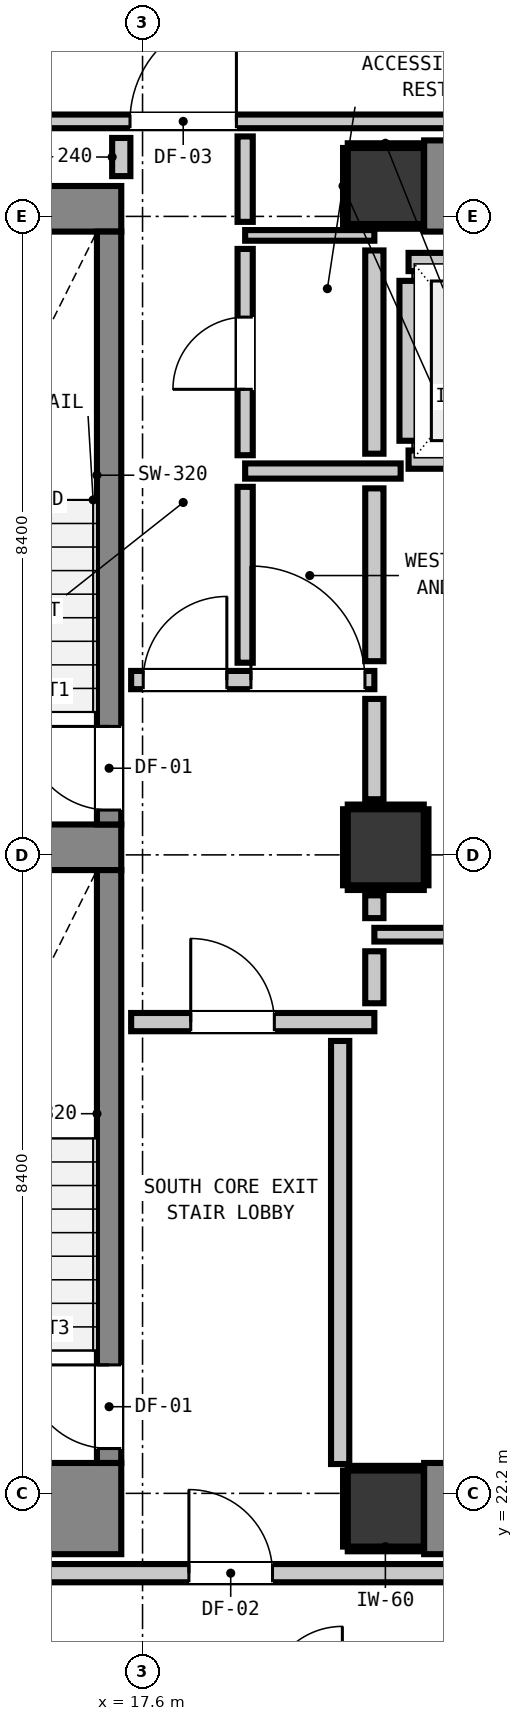
"""IFC4 building model, lengths in metres.
Left out: names, types, materials, properties, quantities, classifications, styles, units other than length and angle.
Written with IfcOpenShell. Run it as: python <this file> out.ifc"""

import sys

from ifc_helpers import new_model, si_unit, direction, frame, frame_2d, origin, origin_2d, place, context, subcontext, project, spatial, rectangle, extrude, element, fill, save


model = new_model("IFC4")
c1 = context("Model", 3, precision=1e-05, world=origin(), true_north=direction((0.0, 1.0)))
c2 = subcontext(c1, "Body", "Model", "MODEL_VIEW")
j1 = project(units=[si_unit("LENGTHUNIT", "METRE"), si_unit("PLANEANGLEUNIT", "RADIAN")], contexts=[c1])
p1 = place(None, origin())
s1 = spatial("IfcSite", under=j1, at=p1, CompositionType="ELEMENT")
p2 = place(p1, origin())
s2 = spatial("IfcBuilding", under=s1, at=p2, CompositionType="ELEMENT")
p3 = place(p2, frame((0.0, 0.0, 22.0)))
s3 = spatial("IfcBuildingStorey", under=s2, at=p3, CompositionType="ELEMENT", Elevation=22.0)
for number, where, z_axis, x_axis in (
    (1, (20.8, 22.0, 0.0), (0.0, 0.0, 1.0), (1.0, 0.0, 0.0)),
    (2, (20.8, 39.4, 0.0), (0.0, 0.0, 1.0), (1.0, 0.0, 0.0)),
):
    element("IfcColumn", number, at=place(p3, frame(where, z_axis=z_axis, x_axis=x_axis)), inside=s3, PredefinedType="COLUMN", context=c2, shape_type="SweptSolid", body=[
        extrude(rectangle(XDim=1.0, YDim=1.0, at=origin_2d()), origin(), (0.0, 0.0, 1.0), 3.32),
    ])
p4 = place(p3, frame((13.24, 22.0, 0.0), z_axis=(0.0, 0.0, 1.0), x_axis=(1.0, 0.0, 0.0)))
e3 = element("IfcWall", 3, at=p4, inside=s3, PredefinedType="SHEAR", context=c2, shape_type="SweptSolid", body=[
    extrude(rectangle(XDim=4.08, YDim=1.2, at=frame_2d((2.04, 0.0))), origin(), (0.0, 0.0, 1.0), 3.32),
])
p5 = place(p3, frame((13.24, 39.1, 0.0), z_axis=(0.0, 0.0, 1.0), x_axis=(1.0, 0.0, 0.0)))
e4 = element("IfcWall", 4, at=p5, inside=s3, PredefinedType="SHEAR", context=c2, shape_type="SweptSolid", body=[
    extrude(rectangle(XDim=4.08, YDim=0.6, at=frame_2d((2.04, 0.0))), origin(), (0.0, 0.0, 1.0), 3.32),
])
p6 = place(p3, frame((13.905, 30.7, 0.0), z_axis=(0.0, 0.0, 1.0), x_axis=(1.0, 0.0, 0.0)))
e5 = element("IfcWall", 5, at=p6, inside=s3, PredefinedType="SHEAR", context=c2, shape_type="SweptSolid", body=[
    extrude(rectangle(XDim=3.415, YDim=0.6, at=frame_2d((1.708, 0.0))), origin(), (0.0, 0.0, 1.0), 3.32),
])
for number, where, z_axis, x_axis in (
    (6, (21.305, 22.0, 0.0), (0.0, 0.0, 1.0), (1.0, 0.0, 0.0)),
    (7, (21.305, 39.4, 0.0), (0.0, 0.0, 1.0), (1.0, 0.0, 0.0)),
):
    element("IfcWall", number, at=place(p3, frame(where, z_axis=z_axis, x_axis=x_axis)), inside=s3, PredefinedType="SHEAR", context=c2, shape_type="SweptSolid", body=[
        extrude(rectangle(XDim=7.39, YDim=1.2, at=frame_2d((3.695, 0.0))), origin(), (0.0, 0.0, 1.0), 3.32),
    ])
p7 = place(p3, frame((17.16, 31.0, 0.0), z_axis=(0.0, 0.0, 1.0), x_axis=(0.0, 1.0, 0.0)))
e8 = element("IfcWall", 8, at=p7, inside=s3, PredefinedType="SHEAR", context=c2, shape_type="SweptSolid", body=[
    extrude(rectangle(XDim=7.8, YDim=0.32, at=frame_2d((3.9, 0.0))), origin(), (0.0, 0.0, 1.0), 3.32),
])
p8 = place(p7, frame((0.19, 0.0, 0.0)))
e9 = element("IfcOpeningElement", 9, at=p8, cuts=e8, PredefinedType="OPENING", context=c2, shape_type="SweptSolid", body=[
    extrude(rectangle(XDim=1.1, YDim=2.15, at=frame_2d((0.55, 1.075))), frame((0.0, 0.17, 0.0), z_axis=(0.0, -1.0, 0.0), x_axis=(1.0, 0.0, 0.0)), (0.0, 0.0, 1.0), 0.34),
])
p9 = place(p3, frame((17.16, 22.6, 0.0), z_axis=(0.0, 0.0, 1.0), x_axis=(0.0, 1.0, 0.0)))
e10 = element("IfcWall", 10, at=p9, inside=s3, PredefinedType="SHEAR", context=c2, shape_type="SweptSolid", body=[
    extrude(rectangle(XDim=7.8, YDim=0.32, at=frame_2d((3.9, 0.0))), origin(), (0.0, 0.0, 1.0), 3.32),
])
p10 = place(p9, frame((0.19, 0.0, 0.0)))
e11 = element("IfcOpeningElement", 11, at=p10, cuts=e10, PredefinedType="OPENING", context=c2, shape_type="SweptSolid", body=[
    extrude(rectangle(XDim=1.1, YDim=2.15, at=frame_2d((0.55, 1.075))), frame((0.0, 0.17, 0.0), z_axis=(0.0, -1.0, 0.0), x_axis=(1.0, 0.0, 0.0)), (0.0, 0.0, 1.0), 0.34),
])
p11 = place(p3, frame((20.8, 30.7, 0.0), z_axis=(0.0, 0.0, 1.0), x_axis=(1.0, 0.0, 0.0)))
e12 = element("IfcColumn", 12, at=p11, inside=s3, PredefinedType="COLUMN", context=c2, shape_type="SweptSolid", body=[
    extrude(rectangle(XDim=1.0, YDim=1.0, at=origin_2d()), origin(), (0.0, 0.0, 1.0), 3.32),
])
for number, where, z_axis, x_axis in (
    (13, (21.1, 35.8, 0.0), (0.0, 0.0, 1.0), (1.0, 0.0, 0.0)),
    (14, (21.1, 38.4, 0.0), (0.0, 0.0, 1.0), (1.0, 0.0, 0.0)),
):
    element("IfcWall", number, at=place(p3, frame(where, z_axis=z_axis, x_axis=x_axis)), inside=s3, PredefinedType="PARTITIONING", context=c2, shape_type="SweptSolid", body=[
        extrude(rectangle(XDim=2.2, YDim=0.24, at=frame_2d((1.1, 0.0))), origin(), (0.0, 0.0, 1.0), 3.06),
    ])
p12 = place(p3, frame((21.1, 36.048, 0.0), z_axis=(0.0, 0.0, 1.0), x_axis=(0.0, 1.0, 0.0)))
e15 = element("IfcWall", 15, at=p12, inside=s3, PredefinedType="PARTITIONING", context=c2, shape_type="SweptSolid", body=[
    extrude(rectangle(XDim=2.104, YDim=0.24, at=frame_2d((1.052, 0.0))), origin(), (0.0, 0.0, 1.0), 2.295),
])
p13 = place(p3, frame((1.827, 21.15, 0.0), z_axis=(0.0, 0.0, 1.0), x_axis=(1.0, 0.0, 0.0)))
e16 = element("IfcWall", 16, at=p13, inside=s3, PredefinedType="PARTITIONING", context=c2, shape_type="SweptSolid", body=[
    extrude(rectangle(XDim=42.146, YDim=0.24, at=frame_2d((21.073, 0.0))), origin(), (0.0, 0.0, 1.0), 3.06),
])
p14 = place(p13, frame((16.383, 0.0, 0.0)))
e17 = element("IfcOpeningElement", 17, at=p14, cuts=e16, PredefinedType="OPENING", context=c2, shape_type="SweptSolid", body=[
    extrude(rectangle(XDim=1.1, YDim=2.15, at=frame_2d((0.55, 1.075))), frame((0.0, 0.13, 0.0), z_axis=(0.0, -1.0, 0.0), x_axis=(1.0, 0.0, 0.0)), (0.0, 0.0, 1.0), 0.26),
])
p15 = place(p13, frame((8.647, 0.0, 0.0)))
e18 = element("IfcOpeningElement", 18, at=p15, cuts=e16, PredefinedType="OPENING", context=c2, shape_type="SweptSolid", body=[
    extrude(rectangle(XDim=1.4, YDim=2.15, at=frame_2d((0.7, 1.075))), frame((0.0, 0.13, 0.0), z_axis=(0.0, -1.0, 0.0), x_axis=(1.0, 0.0, 0.0)), (0.0, 0.0, 1.0), 0.26),
])
p16 = place(p13, frame((38.524, 0.0, 0.0)))
e19 = element("IfcOpeningElement", 19, at=p16, cuts=e16, PredefinedType="OPENING", context=c2, shape_type="SweptSolid", body=[
    extrude(rectangle(XDim=1.0, YDim=2.15, at=frame_2d((0.5, 1.075))), frame((0.0, 0.13, 0.0), z_axis=(0.0, -1.0, 0.0), x_axis=(1.0, 0.0, 0.0)), (0.0, 0.0, 1.0), 0.26),
])
p17 = place(p3, frame((17.45, 28.4, 0.0), z_axis=(0.0, 0.0, 1.0), x_axis=(1.0, 0.0, 0.0)))
e20 = element("IfcWall", 20, at=p17, inside=s3, PredefinedType="PARTITIONING", context=c2, shape_type="SweptSolid", body=[
    extrude(rectangle(XDim=3.2, YDim=0.24, at=frame_2d((1.6, 0.0))), origin(), (0.0, 0.0, 1.0), 3.06),
])
p18 = place(p17, frame((0.784, 0.0, 0.0)))
e21 = element("IfcOpeningElement", 21, at=p18, cuts=e20, PredefinedType="OPENING", context=c2, shape_type="SweptSolid", body=[
    extrude(rectangle(XDim=1.1, YDim=2.15, at=frame_2d((0.55, 1.075))), frame((0.0, 0.13, 0.0), z_axis=(0.0, -1.0, 0.0), x_axis=(1.0, 0.0, 0.0)), (0.0, 0.0, 1.0), 0.26),
])
p19 = place(p3, frame((17.45, 32.9, 0.0), z_axis=(0.0, 0.0, 1.0), x_axis=(1.0, 0.0, 0.0)))
e22 = element("IfcWall", 22, at=p19, inside=s3, PredefinedType="PARTITIONING", context=c2, shape_type="SweptSolid", body=[
    extrude(rectangle(XDim=3.2, YDim=0.24, at=frame_2d((1.6, 0.0))), origin(), (0.0, 0.0, 1.0), 3.06),
])
p20 = place(p19, frame((0.159, 0.0, 0.0)))
e23 = element("IfcOpeningElement", 23, at=p20, cuts=e22, PredefinedType="OPENING", context=c2, shape_type="SweptSolid", body=[
    extrude(rectangle(XDim=1.1, YDim=2.15, at=frame_2d((0.55, 1.075))), frame((0.0, 0.13, 0.0), z_axis=(0.0, -1.0, 0.0), x_axis=(1.0, 0.0, 0.0)), (0.0, 0.0, 1.0), 0.26),
])
p21 = place(p19, frame((1.576, 0.0, 0.0)))
e24 = element("IfcOpeningElement", 24, at=p21, cuts=e22, PredefinedType="OPENING", context=c2, shape_type="SweptSolid", body=[
    extrude(rectangle(XDim=1.5, YDim=2.15, at=frame_2d((0.75, 1.075))), frame((0.0, 0.13, 0.0), z_axis=(0.0, -1.0, 0.0), x_axis=(1.0, 0.0, 0.0)), (0.0, 0.0, 1.0), 0.26),
])
p22 = place(p3, frame((18.95, 35.65, 0.0), z_axis=(0.0, 0.0, 1.0), x_axis=(1.0, 0.0, 0.0)))
e25 = element("IfcWall", 25, at=p22, inside=s3, PredefinedType="PARTITIONING", context=c2, shape_type="SweptSolid", body=[
    extrude(rectangle(XDim=2.046, YDim=0.2, at=frame_2d((1.023, 0.0))), origin(), (0.0, 0.0, 1.0), 3.06),
])
p23 = place(p3, frame((20.65, 29.55, 0.0), z_axis=(0.0, 0.0, 1.0), x_axis=(1.0, 0.0, 0.0)))
e26 = element("IfcWall", 26, at=p23, inside=s3, PredefinedType="PARTITIONING", context=c2, shape_type="SweptSolid", body=[
    extrude(rectangle(XDim=9.325, YDim=0.18, at=frame_2d((4.663, 0.0))), origin(), (0.0, 0.0, 1.0), 3.06),
])
p24 = place(p3, frame((12.989, 40.25, 0.0), z_axis=(0.0, 0.0, 1.0), x_axis=(1.0, 0.0, 0.0)))
e27 = element("IfcWall", 27, at=p24, inside=s3, PredefinedType="PARTITIONING", context=c2, shape_type="SweptSolid", body=[
    extrude(rectangle(XDim=30.984, YDim=0.18, at=frame_2d((15.492, 0.0))), origin(), (0.0, 0.0, 1.0), 3.06),
])
p25 = place(p24, frame((4.446, 0.0, 0.0)))
e28 = element("IfcOpeningElement", 28, at=p25, cuts=e27, PredefinedType="OPENING", context=c2, shape_type="SweptSolid", body=[
    extrude(rectangle(XDim=1.4, YDim=2.15, at=frame_2d((0.7, 1.075))), frame((0.0, 0.1, 0.0), z_axis=(0.0, -1.0, 0.0), x_axis=(1.0, 0.0, 0.0)), (0.0, 0.0, 1.0), 0.2),
])
p26 = place(p24, frame((27.362, 0.0, 0.0)))
e29 = element("IfcOpeningElement", 29, at=p26, cuts=e27, PredefinedType="OPENING", context=c2, shape_type="SweptSolid", body=[
    extrude(rectangle(XDim=1.0, YDim=2.15, at=frame_2d((0.5, 1.075))), frame((0.0, 0.1, 0.0), z_axis=(0.0, -1.0, 0.0), x_axis=(1.0, 0.0, 0.0)), (0.0, 0.0, 1.0), 0.2),
])
p27 = place(p3, frame((18.95, 38.75, 0.0), z_axis=(0.0, 0.0, 1.0), x_axis=(1.0, 0.0, 0.0)))
e30 = element("IfcWall", 30, at=p27, inside=s3, PredefinedType="PARTITIONING", context=c2, shape_type="SweptSolid", body=[
    extrude(rectangle(XDim=1.7, YDim=0.14, at=frame_2d((0.85, 0.0))), origin(), (0.0, 0.0, 1.0), 3.06),
])
p28 = place(p3, frame((17.32, 39.53, 0.0), z_axis=(0.0, 0.0, 1.0), x_axis=(0.0, 1.0, 0.0)))
e31 = element("IfcWall", 31, at=p28, inside=s3, PredefinedType="PARTITIONING", context=c2, shape_type="SweptSolid", body=[
    extrude(rectangle(XDim=0.502, YDim=0.24, at=frame_2d((0.251, 0.0))), origin(), (0.0, 0.0, 1.0), 3.06),
])
p29 = place(p3, frame((20.2, 22.586, 0.0), z_axis=(0.0, 0.0, 1.0), x_axis=(0.0, 1.0, 0.0)))
e32 = element("IfcWall", 32, at=p29, inside=s3, PredefinedType="PARTITIONING", context=c2, shape_type="SweptSolid", body=[
    extrude(rectangle(XDim=5.566, YDim=0.24, at=frame_2d((2.783, 0.0))), origin(), (0.0, 0.0, 1.0), 3.06),
])
p30 = place(p3, frame((20.65, 28.648, 0.0), z_axis=(0.0, 0.0, 1.0), x_axis=(0.0, 1.0, 0.0)))
e33 = element("IfcWall", 33, at=p30, inside=s3, PredefinedType="PARTITIONING", context=c2, shape_type="SweptSolid", body=[
    extrude(rectangle(XDim=0.684, YDim=0.24, at=frame_2d((0.342, 0.0))), origin(), (0.0, 0.0, 1.0), 2.295),
])
p31 = place(p3, frame((20.65, 29.768, 0.0), z_axis=(0.0, 0.0, 1.0), x_axis=(0.0, 1.0, 0.0)))
e34 = element("IfcWall", 34, at=p31, inside=s3, PredefinedType="PARTITIONING", context=c2, shape_type="SweptSolid", body=[
    extrude(rectangle(XDim=0.3, YDim=0.24, at=frame_2d((0.15, 0.0))), origin(), (0.0, 0.0, 1.0), 2.295),
])
p32 = place(p3, frame((20.65, 31.332, 0.0), z_axis=(0.0, 0.0, 1.0), x_axis=(0.0, 1.0, 0.0)))
e35 = element("IfcWall", 35, at=p32, inside=s3, PredefinedType="PARTITIONING", context=c2, shape_type="SweptSolid", body=[
    extrude(rectangle(XDim=1.32, YDim=0.24, at=frame_2d((0.66, 0.0))), origin(), (0.0, 0.0, 1.0), 2.295),
])
p33 = place(p3, frame((20.65, 33.148, 0.0), z_axis=(0.0, 0.0, 1.0), x_axis=(0.0, 1.0, 0.0)))
e36 = element("IfcWall", 36, at=p33, inside=s3, PredefinedType="PARTITIONING", context=c2, shape_type="SweptSolid", body=[
    extrude(rectangle(XDim=2.274, YDim=0.24, at=frame_2d((1.137, 0.0))), origin(), (0.0, 0.0, 1.0), 2.295),
])
p34 = place(p3, frame((20.65, 35.878, 0.0), z_axis=(0.0, 0.0, 1.0), x_axis=(0.0, 1.0, 0.0)))
e37 = element("IfcWall", 37, at=p34, inside=s3, PredefinedType="PARTITIONING", context=c2, shape_type="SweptSolid", body=[
    extrude(rectangle(XDim=2.674, YDim=0.24, at=frame_2d((1.337, 0.0))), origin(), (0.0, 0.0, 1.0), 2.295),
])
p35 = place(p3, frame((18.95, 33.128, 0.0), z_axis=(0.0, 0.0, 1.0), x_axis=(0.0, 1.0, 0.0)))
e38 = element("IfcWall", 38, at=p35, inside=s3, PredefinedType="PARTITIONING", context=c2, shape_type="SweptSolid", body=[
    extrude(rectangle(XDim=2.314, YDim=0.2, at=frame_2d((1.157, 0.0))), origin(), (0.0, 0.0, 1.0), 3.06),
])
p36 = place(p3, frame((18.95, 35.858, 0.0), z_axis=(0.0, 0.0, 1.0), x_axis=(0.0, 1.0, 0.0)))
e39 = element("IfcWall", 39, at=p36, inside=s3, PredefinedType="PARTITIONING", context=c2, shape_type="SweptSolid", body=[
    extrude(rectangle(XDim=2.714, YDim=0.2, at=frame_2d((1.357, 0.0))), origin(), (0.0, 0.0, 1.0), 3.06),
])
p37 = place(p36, frame((0.867, 0.0, 0.0)))
e40 = element("IfcOpeningElement", 40, at=p37, cuts=e39, PredefinedType="OPENING", context=c2, shape_type="SweptSolid", body=[
    extrude(rectangle(XDim=0.95, YDim=2.1, at=frame_2d((0.475, 1.05))), frame((0.0, 0.11, 0.0), z_axis=(0.0, -1.0, 0.0), x_axis=(1.0, 0.0, 0.0)), (0.0, 0.0, 1.0), 0.22),
])
p38 = place(p3, frame((18.95, 38.928, 0.0), z_axis=(0.0, 0.0, 1.0), x_axis=(0.0, 1.0, 0.0)))
e41 = element("IfcWall", 41, at=p38, inside=s3, PredefinedType="PARTITIONING", context=c2, shape_type="SweptSolid", body=[
    extrude(rectangle(XDim=1.124, YDim=0.2, at=frame_2d((0.562, 0.0))), origin(), (0.0, 0.0, 1.0), 3.06),
])
for number, where, z_axis, x_axis in (
    (42, (20.3, 21.468, 0.0), (0.0, 0.0, 1.0), (1.0, 0.0, 0.0)),
    (43, (20.3, 22.532, 0.0), (0.0, 0.0, 1.0), (1.0, 0.0, 0.0)),
):
    element("IfcWall", number, at=place(p3, frame(where, z_axis=z_axis, x_axis=x_axis)), inside=s3, PredefinedType="PARTITIONING", context=c2, shape_type="SweptSolid", body=[
        extrude(rectangle(XDim=0.99, YDim=0.06, at=frame_2d((0.495, 0.0))), origin(), (0.0, 0.0, 1.0), 1.45),
    ])
p39 = place(p3, frame((20.268, 21.5, 0.0), z_axis=(0.0, 0.0, 1.0), x_axis=(0.0, 1.0, 0.0)))
e44 = element("IfcWall", 44, at=p39, inside=s3, PredefinedType="PARTITIONING", context=c2, shape_type="SweptSolid", body=[
    extrude(rectangle(XDim=1.0, YDim=0.06, at=frame_2d((0.5, 0.0))), origin(), (0.0, 0.0, 1.0), 1.45),
])
for number, where, z_axis, x_axis in (
    (45, (20.3, 38.868, 0.0), (0.0, 0.0, 1.0), (1.0, 0.0, 0.0)),
    (46, (20.3, 39.932, 0.0), (0.0, 0.0, 1.0), (1.0, 0.0, 0.0)),
):
    element("IfcWall", number, at=place(p3, frame(where, z_axis=z_axis, x_axis=x_axis)), inside=s3, PredefinedType="PARTITIONING", context=c2, shape_type="SweptSolid", body=[
        extrude(rectangle(XDim=0.99, YDim=0.06, at=frame_2d((0.495, 0.0))), origin(), (0.0, 0.0, 1.0), 1.45),
    ])
for number, where, z_axis, x_axis in (
    (47, (20.268, 38.9, 0.0), (0.0, 0.0, 1.0), (0.0, 1.0, 0.0)),
    (48, (20.3, 30.168, 0.0), (0.0, 0.0, 1.0), (1.0, 0.0, 0.0)),
    (49, (20.3, 31.232, 0.0), (0.0, 0.0, 1.0), (1.0, 0.0, 0.0)),
    (50, (20.268, 30.2, 0.0), (0.0, 0.0, 1.0), (0.0, 1.0, 0.0)),
    (51, (21.332, 30.2, 0.0), (0.0, 0.0, 1.0), (0.0, 1.0, 0.0)),
):
    element("IfcWall", number, at=place(p3, frame(where, z_axis=z_axis, x_axis=x_axis)), inside=s3, PredefinedType="PARTITIONING", context=c2, shape_type="SweptSolid", body=[
        extrude(rectangle(XDim=1.0, YDim=0.06, at=frame_2d((0.5, 0.0))), origin(), (0.0, 0.0, 1.0), 1.45),
    ])
p40 = place(p8, origin())
e52 = element("IfcDoor", 52, at=p40, inside=s3, OperationType="SINGLE_SWING_RIGHT", PredefinedType="DOOR", context=c2, shape_type="SweptSolid", body=[
    extrude(rectangle(XDim=1.1, YDim=2.15, at=frame_2d((0.55, 1.075))), frame((0.0, 0.025, 0.0), z_axis=(0.0, -1.0, 0.0), x_axis=(1.0, 0.0, 0.0)), (0.0, 0.0, 1.0), 0.05),
])
fill(e9, e52)
p41 = place(p10, origin())
e53 = element("IfcDoor", 53, at=p41, inside=s3, OperationType="SINGLE_SWING_RIGHT", PredefinedType="DOOR", context=c2, shape_type="SweptSolid", body=[
    extrude(rectangle(XDim=1.1, YDim=2.15, at=frame_2d((0.55, 1.075))), frame((0.0, 0.025, 0.0), z_axis=(0.0, -1.0, 0.0), x_axis=(1.0, 0.0, 0.0)), (0.0, 0.0, 1.0), 0.05),
])
fill(e11, e53)
p42 = place(p18, origin())
e54 = element("IfcDoor", 54, at=p42, inside=s3, OperationType="SINGLE_SWING_LEFT", PredefinedType="DOOR", context=c2, shape_type="SweptSolid", body=[
    extrude(rectangle(XDim=1.1, YDim=2.15, at=frame_2d((0.55, 1.075))), frame((0.0, 0.025, 0.0), z_axis=(0.0, -1.0, 0.0), x_axis=(1.0, 0.0, 0.0)), (0.0, 0.0, 1.0), 0.05),
])
fill(e21, e54)
p43 = place(p20, origin())
e55 = element("IfcDoor", 55, at=p43, inside=s3, OperationType="SINGLE_SWING_RIGHT", PredefinedType="DOOR", context=c2, shape_type="SweptSolid", body=[
    extrude(rectangle(XDim=1.1, YDim=2.15, at=frame_2d((0.55, 1.075))), frame((0.0, 0.025, 0.0), z_axis=(0.0, -1.0, 0.0), x_axis=(1.0, 0.0, 0.0)), (0.0, 0.0, 1.0), 0.05),
])
fill(e23, e55)
p44 = place(p14, origin())
e56 = element("IfcDoor", 56, at=p44, inside=s3, OperationType="SINGLE_SWING_LEFT", PredefinedType="DOOR", context=c2, shape_type="SweptSolid", body=[
    extrude(rectangle(XDim=1.1, YDim=2.15, at=frame_2d((0.55, 1.075))), frame((0.0, 0.025, 0.0), z_axis=(0.0, -1.0, 0.0), x_axis=(1.0, 0.0, 0.0)), (0.0, 0.0, 1.0), 0.05),
])
fill(e17, e56)
p45 = place(p25, origin())
e57 = element("IfcDoor", 57, at=p45, inside=s3, OperationType="SINGLE_SWING_RIGHT", PredefinedType="DOOR", context=c2, shape_type="SweptSolid", body=[
    extrude(rectangle(XDim=1.4, YDim=2.15, at=frame_2d((0.7, 1.075))), frame((0.0, 0.025, 0.0), z_axis=(0.0, -1.0, 0.0), x_axis=(1.0, 0.0, 0.0)), (0.0, 0.0, 1.0), 0.05),
])
fill(e28, e57)
p46 = place(p21, origin())
e58 = element("IfcDoor", 58, at=p46, inside=s3, OperationType="SINGLE_SWING_LEFT", PredefinedType="DOOR", context=c2, shape_type="SweptSolid", body=[
    extrude(rectangle(XDim=1.5, YDim=2.15, at=frame_2d((0.75, 1.075))), frame((0.0, 0.025, 0.0), z_axis=(0.0, -1.0, 0.0), x_axis=(1.0, 0.0, 0.0)), (0.0, 0.0, 1.0), 0.05),
])
fill(e24, e58)
p47 = place(p37, origin())
e59 = element("IfcDoor", 59, at=p47, inside=s3, OperationType="SINGLE_SWING_LEFT", PredefinedType="DOOR", context=c2, shape_type="SweptSolid", body=[
    extrude(rectangle(XDim=0.95, YDim=2.1, at=frame_2d((0.475, 1.05))), frame((0.0, 0.025, 0.0), z_axis=(0.0, -1.0, 0.0), x_axis=(1.0, 0.0, 0.0)), (0.0, 0.0, 1.0), 0.05),
])
fill(e40, e59)
save(model, sys.argv[1])
